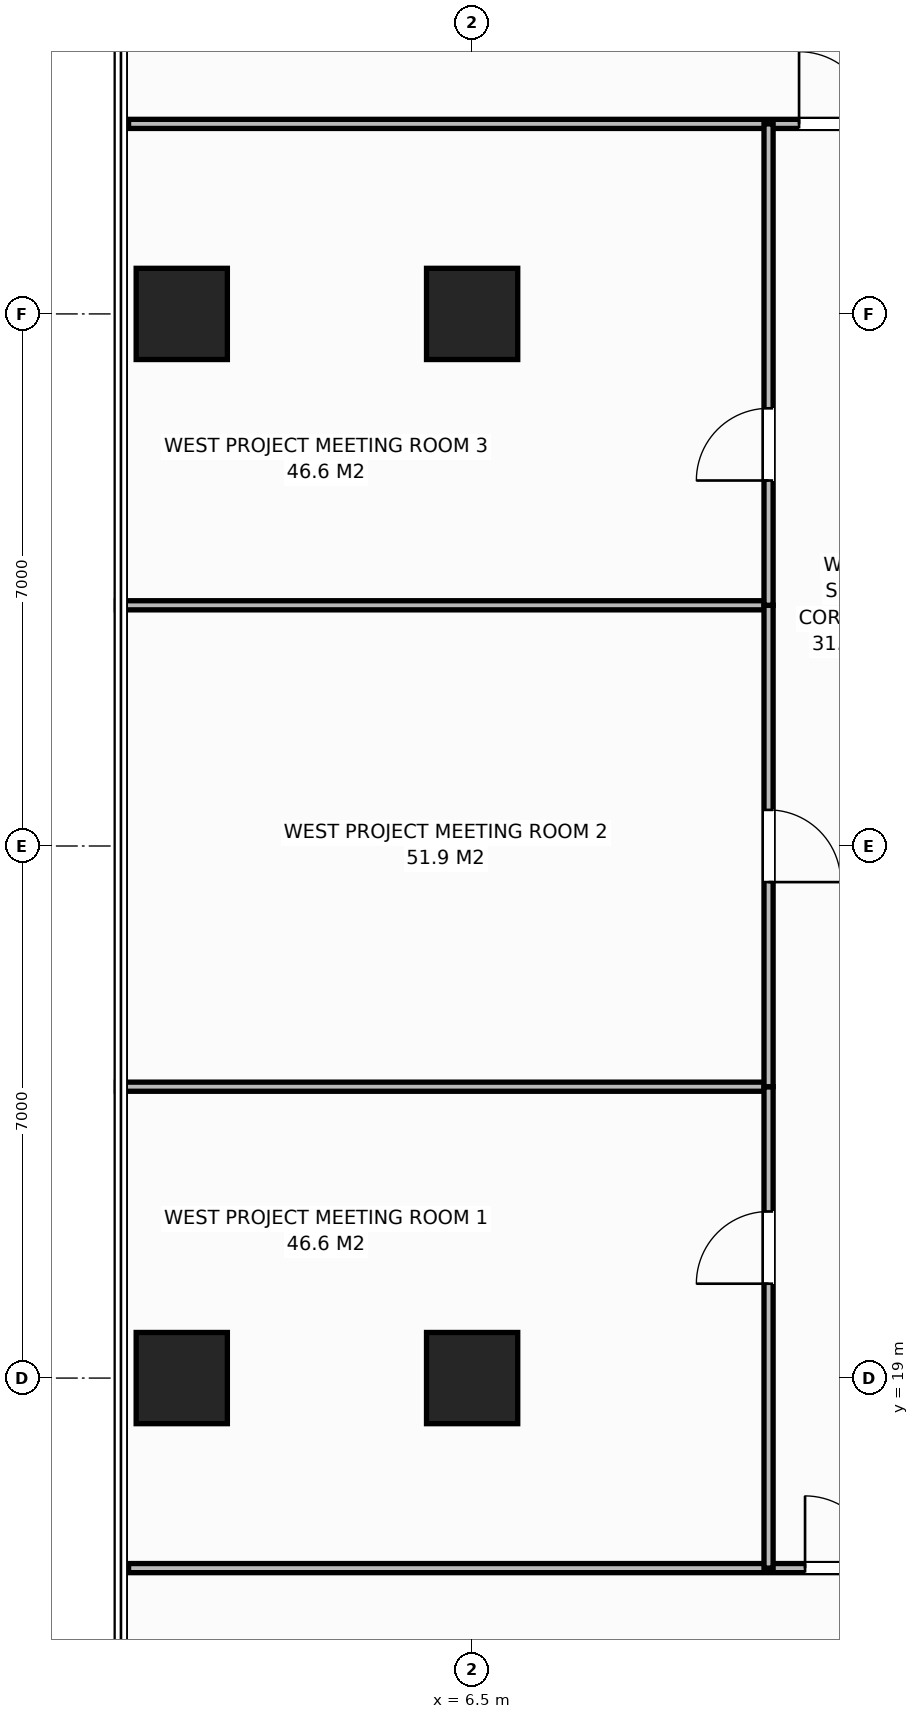
"""IFC4 building model, lengths in metres.
Left out: names, types, materials, properties, quantities, classifications, styles, units other than length and angle.
Written with IfcOpenShell. Run it as: python <this file> out.ifc"""

import sys

from ifc_helpers import new_model, si_unit, direction, frame, frame_2d, origin, origin_2d, place, context, subcontext, project, spatial, rectangle, extrude, element, fill, save


model = new_model("IFC4")
c1 = context("Model", 3, precision=1e-05, world=origin(), true_north=direction((0.0, 1.0)))
c2 = subcontext(c1, "Body", "Model", "MODEL_VIEW")
j1 = project(units=[si_unit("LENGTHUNIT", "METRE"), si_unit("PLANEANGLEUNIT", "RADIAN")], contexts=[c1])
p1 = place(None, origin())
s1 = spatial("IfcSite", under=j1, at=p1, CompositionType="ELEMENT")
p2 = place(p1, origin())
s2 = spatial("IfcBuilding", under=s1, at=p2, CompositionType="ELEMENT")
p3 = place(p2, frame((0.0, 0.0, 116.4)))
s3 = spatial("IfcBuildingStorey", under=s2, at=p3, CompositionType="ELEMENT", Elevation=116.4)
for number, where, z_axis, x_axis in (
    (1, (6.5, 19.0, 0.0), (0.0, 0.0, 1.0), (1.0, 0.0, 0.0)),
    (2, (6.5, 33.0, 0.0), (0.0, 0.0, 1.0), (1.0, 0.0, 0.0)),
    (3, (2.68, 19.0, 0.0), (0.0, 0.0, 1.0), (1.0, 0.0, 0.0)),
    (4, (2.68, 33.0, 0.0), (0.0, 0.0, 1.0), (1.0, 0.0, 0.0)),
):
    element("IfcColumn", number, at=place(p3, frame(where, z_axis=z_axis, x_axis=x_axis)), inside=s3, PredefinedType="COLUMN", context=c2, shape_type="SweptSolid", body=[
        extrude(rectangle(XDim=1.2, YDim=1.2, at=origin_2d()), origin(), (0.0, 0.0, 1.0), 3.8),
    ])
p4 = place(p3, frame((1.98, 35.5, 0.0), z_axis=(0.0, 0.0, 1.0), x_axis=(1.0, 0.0, 0.0)))
e5 = element("IfcWall", 5, at=p4, inside=s3, PredefinedType="PARTITIONING", context=c2, shape_type="SweptSolid", body=[
    extrude(rectangle(XDim=10.172, YDim=0.12, at=frame_2d((5.086, 0.0))), origin(), (0.0, 0.0, 1.0), 3.565),
])
p5 = place(p4, frame((8.821, 0.0, 0.0)))
e6 = element("IfcOpeningElement", 6, at=p5, cuts=e5, PredefinedType="OPENING", context=c2, shape_type="SweptSolid", body=[
    extrude(rectangle(XDim=0.95, YDim=2.15, at=frame_2d((0.475, 1.075))), frame((0.0, 0.07, 0.0), z_axis=(0.0, -1.0, 0.0), x_axis=(1.0, 0.0, 0.0)), (0.0, 0.0, 1.0), 0.14),
])
p6 = place(p3, frame((1.98, 16.5, 0.0), z_axis=(0.0, 0.0, 1.0), x_axis=(1.0, 0.0, 0.0)))
e7 = element("IfcWall", 7, at=p6, inside=s3, PredefinedType="PARTITIONING", context=c2, shape_type="SweptSolid", body=[
    extrude(rectangle(XDim=11.16, YDim=0.12, at=frame_2d((5.58, 0.0))), origin(), (0.0, 0.0, 1.0), 3.565),
])
p7 = place(p6, frame((8.9, 0.0, 0.0)))
e8 = element("IfcOpeningElement", 8, at=p7, cuts=e7, PredefinedType="OPENING", context=c2, shape_type="SweptSolid", body=[
    extrude(rectangle(XDim=0.95, YDim=2.15, at=frame_2d((0.475, 1.075))), frame((0.0, 0.07, 0.0), z_axis=(0.0, -1.0, 0.0), x_axis=(1.0, 0.0, 0.0)), (0.0, 0.0, 1.0), 0.14),
])
p8 = place(p3, frame((1.82, 22.833, 0.0), z_axis=(0.0, 0.0, 1.0), x_axis=(1.0, 0.0, 0.0)))
e9 = element("IfcWall", 9, at=p8, inside=s3, PredefinedType="PARTITIONING", context=c2, shape_type="SweptSolid", body=[
    extrude(rectangle(XDim=8.58, YDim=0.12, at=frame_2d((4.29, 0.0))), origin(), (0.0, 0.0, 1.0), 3.565),
])
p9 = place(p3, frame((10.4, 16.5, 0.0), z_axis=(0.0, 0.0, 1.0), x_axis=(0.0, 1.0, 0.0)))
e10 = element("IfcWall", 10, at=p9, inside=s3, PredefinedType="PARTITIONING", context=c2, shape_type="SweptSolid", body=[
    extrude(rectangle(XDim=6.333, YDim=0.12, at=frame_2d((3.167, 0.0))), origin(), (0.0, 0.0, 1.0), 3.565),
])
p10 = place(p9, frame((3.742, 0.0, 0.0)))
e11 = element("IfcOpeningElement", 11, at=p10, cuts=e10, PredefinedType="OPENING", context=c2, shape_type="SweptSolid", body=[
    extrude(rectangle(XDim=0.95, YDim=2.15, at=frame_2d((0.475, 1.075))), frame((0.0, 0.07, 0.0), z_axis=(0.0, -1.0, 0.0), x_axis=(1.0, 0.0, 0.0)), (0.0, 0.0, 1.0), 0.14),
])
p11 = place(p3, frame((1.82, 29.167, 0.0), z_axis=(0.0, 0.0, 1.0), x_axis=(1.0, 0.0, 0.0)))
e12 = element("IfcWall", 12, at=p11, inside=s3, PredefinedType="PARTITIONING", context=c2, shape_type="SweptSolid", body=[
    extrude(rectangle(XDim=8.58, YDim=0.12, at=frame_2d((4.29, 0.0))), origin(), (0.0, 0.0, 1.0), 3.565),
])
p12 = place(p3, frame((10.4, 22.833, 0.0), z_axis=(0.0, 0.0, 1.0), x_axis=(0.0, 1.0, 0.0)))
e13 = element("IfcWall", 13, at=p12, inside=s3, PredefinedType="PARTITIONING", context=c2, shape_type="SweptSolid", body=[
    extrude(rectangle(XDim=6.333, YDim=0.12, at=frame_2d((3.167, 0.0))), origin(), (0.0, 0.0, 1.0), 3.565),
])
p13 = place(p12, frame((2.692, 0.0, 0.0)))
e14 = element("IfcOpeningElement", 14, at=p13, cuts=e13, PredefinedType="OPENING", context=c2, shape_type="SweptSolid", body=[
    extrude(rectangle(XDim=0.95, YDim=2.15, at=frame_2d((0.475, 1.075))), frame((0.0, 0.07, 0.0), z_axis=(0.0, -1.0, 0.0), x_axis=(1.0, 0.0, 0.0)), (0.0, 0.0, 1.0), 0.14),
])
p14 = place(p3, frame((10.4, 29.167, 0.0), z_axis=(0.0, 0.0, 1.0), x_axis=(0.0, 1.0, 0.0)))
e15 = element("IfcWall", 15, at=p14, inside=s3, PredefinedType="PARTITIONING", context=c2, shape_type="SweptSolid", body=[
    extrude(rectangle(XDim=6.333, YDim=0.12, at=frame_2d((3.167, 0.0))), origin(), (0.0, 0.0, 1.0), 3.565),
])
p15 = place(p14, frame((1.642, 0.0, 0.0)))
e16 = element("IfcOpeningElement", 16, at=p15, cuts=e15, PredefinedType="OPENING", context=c2, shape_type="SweptSolid", body=[
    extrude(rectangle(XDim=0.95, YDim=2.15, at=frame_2d((0.475, 1.075))), frame((0.0, 0.07, 0.0), z_axis=(0.0, -1.0, 0.0), x_axis=(1.0, 0.0, 0.0)), (0.0, 0.0, 1.0), 0.14),
])
p16 = place(p5, origin())
e17 = element("IfcDoor", 17, at=p16, inside=s3, OperationType="SINGLE_SWING_LEFT", PredefinedType="DOOR", context=c2, shape_type="SweptSolid", body=[
    extrude(rectangle(XDim=0.95, YDim=2.15, at=frame_2d((0.475, 1.075))), frame((0.0, 0.025, 0.0), z_axis=(0.0, -1.0, 0.0), x_axis=(1.0, 0.0, 0.0)), (0.0, 0.0, 1.0), 0.05),
])
fill(e6, e17)
p17 = place(p7, origin())
e18 = element("IfcDoor", 18, at=p17, inside=s3, OperationType="SINGLE_SWING_LEFT", PredefinedType="DOOR", context=c2, shape_type="SweptSolid", body=[
    extrude(rectangle(XDim=0.95, YDim=2.15, at=frame_2d((0.475, 1.075))), frame((0.0, 0.025, 0.0), z_axis=(0.0, -1.0, 0.0), x_axis=(1.0, 0.0, 0.0)), (0.0, 0.0, 1.0), 0.05),
])
fill(e8, e18)
p18 = place(p10, origin())
e19 = element("IfcDoor", 19, at=p18, inside=s3, OperationType="SINGLE_SWING_LEFT", PredefinedType="DOOR", context=c2, shape_type="SweptSolid", body=[
    extrude(rectangle(XDim=0.95, YDim=2.15, at=frame_2d((0.475, 1.075))), frame((0.0, 0.025, 0.0), z_axis=(0.0, -1.0, 0.0), x_axis=(1.0, 0.0, 0.0)), (0.0, 0.0, 1.0), 0.05),
])
fill(e11, e19)
p19 = place(p13, origin())
e20 = element("IfcDoor", 20, at=p19, inside=s3, OperationType="SINGLE_SWING_RIGHT", PredefinedType="DOOR", context=c2, shape_type="SweptSolid", body=[
    extrude(rectangle(XDim=0.95, YDim=2.15, at=frame_2d((0.475, 1.075))), frame((0.0, 0.025, 0.0), z_axis=(0.0, -1.0, 0.0), x_axis=(1.0, 0.0, 0.0)), (0.0, 0.0, 1.0), 0.05),
])
fill(e14, e20)
p20 = place(p15, origin())
e21 = element("IfcDoor", 21, at=p20, inside=s3, OperationType="SINGLE_SWING_LEFT", PredefinedType="DOOR", context=c2, shape_type="SweptSolid", body=[
    extrude(rectangle(XDim=0.95, YDim=2.15, at=frame_2d((0.475, 1.075))), frame((0.0, 0.025, 0.0), z_axis=(0.0, -1.0, 0.0), x_axis=(1.0, 0.0, 0.0)), (0.0, 0.0, 1.0), 0.05),
])
fill(e16, e21)
save(model, sys.argv[1])
